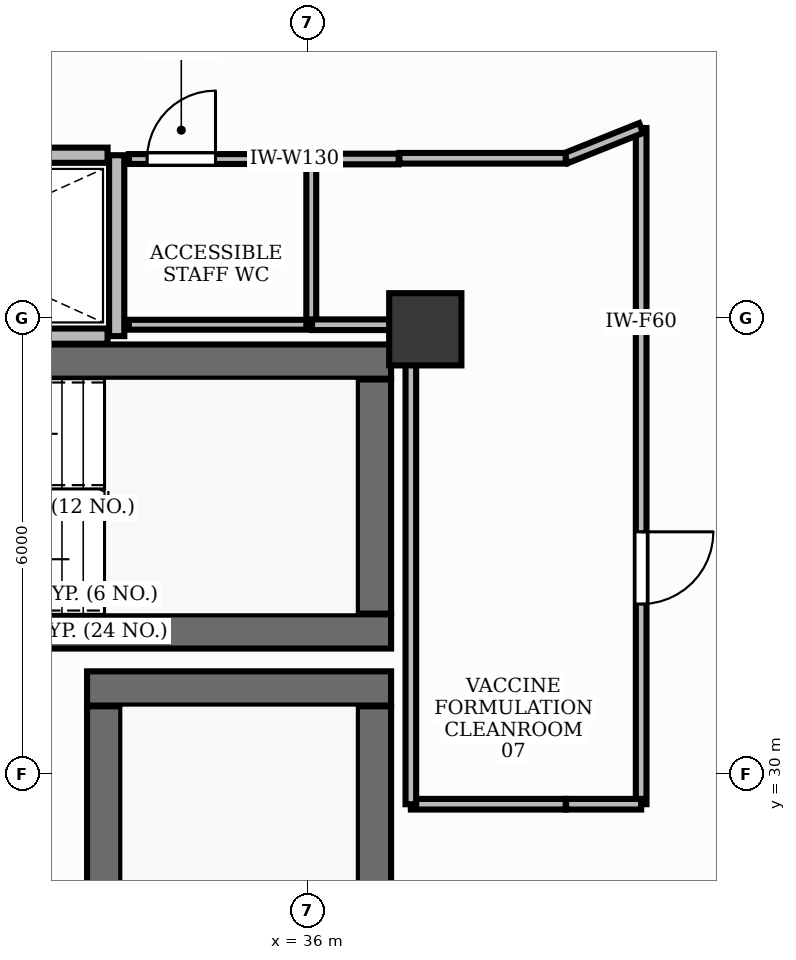
"""IFC4 building model, lengths in metres.
Left out: names, types, materials, properties, quantities, classifications, styles, units other than length and angle.
Written with IfcOpenShell. Run it as: python <this file> out.ifc"""

import sys

from ifc_helpers import new_model, si_unit, direction, frame, frame_2d, origin, origin_2d, place, context, subcontext, project, spatial, rectangle, extrude, element, fill, save


model = new_model("IFC4")
c1 = context("Model", 3, precision=1e-05, world=origin(), true_north=direction((0.0, 1.0)))
c2 = subcontext(c1, "Body", "Model", "MODEL_VIEW")
j1 = project(units=[si_unit("LENGTHUNIT", "METRE"), si_unit("PLANEANGLEUNIT", "RADIAN")], contexts=[c1])
p1 = place(None, origin())
s1 = spatial("IfcSite", under=j1, at=p1, CompositionType="ELEMENT")
p2 = place(p1, origin())
s2 = spatial("IfcBuilding", under=s1, at=p2, CompositionType="ELEMENT")
p3 = place(p2, frame((0.0, 0.0, 94.2)))
s3 = spatial("IfcBuildingStorey", under=s2, at=p3, CompositionType="ELEMENT", Elevation=94.2)
p4 = place(p3, frame((28.852, 35.425, 0.0), z_axis=(0.0, 0.0, 1.0), x_axis=(1.0, 0.0, 0.0)))
e1 = element("IfcWall", 1, at=p4, inside=s3, PredefinedType="SHEAR", context=c2, shape_type="SweptSolid", body=[
    extrude(rectangle(XDim=8.248, YDim=0.45, at=frame_2d((4.124, 0.0))), origin(), (0.0, 0.0, 1.0), 3.9),
])
p5 = place(p3, frame((28.35, 31.875, 0.0), z_axis=(0.0, 0.0, 1.0), x_axis=(1.0, 0.0, 0.0)))
e2 = element("IfcWall", 2, at=p5, inside=s3, PredefinedType="SHEAR", context=c2, shape_type="SweptSolid", body=[
    extrude(rectangle(XDim=8.75, YDim=0.45, at=frame_2d((4.375, 0.0))), origin(), (0.0, 0.0, 1.0), 3.9),
])
p6 = place(p3, frame((36.875, 32.11, 0.0), z_axis=(0.0, 0.0, 1.0), x_axis=(0.0, 1.0, 0.0)))
e3 = element("IfcWall", 3, at=p6, inside=s3, PredefinedType="SHEAR", context=c2, shape_type="SweptSolid", body=[
    extrude(rectangle(XDim=3.08, YDim=0.45, at=frame_2d((1.54, 0.0))), origin(), (0.0, 0.0, 1.0), 3.9),
])
p7 = place(p3, frame((33.1, 31.125, 0.0), z_axis=(0.0, 0.0, 1.0), x_axis=(1.0, 0.0, 0.0)))
e4 = element("IfcWall", 4, at=p7, inside=s3, PredefinedType="SHEAR", context=c2, shape_type="SweptSolid", body=[
    extrude(rectangle(XDim=4.0, YDim=0.45, at=frame_2d((2.0, 0.0))), origin(), (0.0, 0.0, 1.0), 3.9),
])
p8 = place(p3, frame((36.875, 23.11, 0.0), z_axis=(0.0, 0.0, 1.0), x_axis=(0.0, 1.0, 0.0)))
e5 = element("IfcWall", 5, at=p8, inside=s3, PredefinedType="SHEAR", context=c2, shape_type="SweptSolid", body=[
    extrude(rectangle(XDim=7.78, YDim=0.45, at=frame_2d((3.89, 0.0))), origin(), (0.0, 0.0, 1.0), 3.9),
])
p9 = place(p3, frame((33.325, 23.11, 0.0), z_axis=(0.0, 0.0, 1.0), x_axis=(0.0, 1.0, 0.0)))
e6 = element("IfcWall", 6, at=p9, inside=s3, PredefinedType="SHEAR", context=c2, shape_type="SweptSolid", body=[
    extrude(rectangle(XDim=7.78, YDim=0.45, at=frame_2d((3.89, 0.0))), origin(), (0.0, 0.0, 1.0), 3.9),
])
p10 = place(p9, frame((0.2, 0.0, 0.0)))
e7 = element("IfcOpeningElement", 7, at=p10, cuts=e6, PredefinedType="OPENING", context=c2, shape_type="SweptSolid", body=[
    extrude(rectangle(XDim=1.05, YDim=2.15, at=frame_2d((0.525, 1.075))), frame((0.0, 0.24, 0.0), z_axis=(0.0, -1.0, 0.0), x_axis=(1.0, 0.0, 0.0)), (0.0, 0.0, 1.0), 0.48),
])
p11 = place(p3, frame((37.55, 35.85, -0.0), z_axis=(0.0, 0.0, 1.0), x_axis=(1.0, 0.0, 0.0)))
e8 = element("IfcColumn", 8, at=p11, inside=s3, PredefinedType="PILASTER", context=c2, shape_type="SweptSolid", body=[
    extrude(rectangle(XDim=0.95, YDim=0.95, at=origin_2d()), origin(), (0.0, 0.0, 1.0), 3.901),
])
p12 = place(p3, frame((33.49, 35.76, 0.0), z_axis=(0.0, 0.0, 1.0), x_axis=(0.0, 1.0, 0.0)))
e9 = element("IfcWall", 9, at=p12, inside=s3, PredefinedType="PARTITIONING", context=c2, shape_type="SweptSolid", body=[
    extrude(rectangle(XDim=2.38, YDim=0.2, at=frame_2d((1.19, 0.0))), origin(), (0.0, 0.0, 1.0), 2.91),
])
for number, where, z_axis, x_axis in (
    (10, (28.8, 35.76, 0.0), (0.0, 0.0, 1.0), (1.0, 0.0, 0.0)),
    (11, (28.8, 38.14, 0.0), (0.0, 0.0, 1.0), (1.0, 0.0, 0.0)),
):
    element("IfcWall", number, at=place(p3, frame(where, z_axis=z_axis, x_axis=x_axis)), inside=s3, PredefinedType="PARTITIONING", context=c2, shape_type="SweptSolid", body=[
        extrude(rectangle(XDim=4.57, YDim=0.2, at=frame_2d((2.285, 0.0))), origin(), (0.0, 0.0, 1.0), 2.91),
    ])
p13 = place(p3, frame((33.65, 38.09, 0.0), z_axis=(0.0, 0.0, 1.0), x_axis=(1.0, 0.0, 0.0)))
e12 = element("IfcWall", 12, at=p13, inside=s3, PredefinedType="PARTITIONING", context=c2, shape_type="SweptSolid", body=[
    extrude(rectangle(XDim=2.4, YDim=0.13, at=frame_2d((1.2, 0.0))), origin(), (0.0, 0.0, 1.0), 2.91),
])
p14 = place(p13, frame((0.24, 0.0, 0.0)))
e13 = element("IfcOpeningElement", 13, at=p14, cuts=e12, PredefinedType="OPENING", context=c2, shape_type="SweptSolid", body=[
    extrude(rectangle(XDim=0.9, YDim=2.15, at=frame_2d((0.45, 1.075))), frame((0.0, 0.08, 0.0), z_axis=(0.0, -1.0, 0.0), x_axis=(1.0, 0.0, 0.0)), (0.0, 0.0, 1.0), 0.16),
])
p15 = place(p3, frame((40.39, 38.498, 0.0), z_axis=(0.0, 0.0, 1.0), x_axis=(0.0, -1.0, 0.0)))
e14 = element("IfcWall", 14, at=p15, inside=s3, PredefinedType="PARTITIONING", context=c2, shape_type="SweptSolid", body=[
    extrude(rectangle(XDim=8.896, YDim=0.14, at=frame_2d((4.448, 0.0))), origin(), (0.0, 0.0, 1.0), 2.91),
])
p16 = place(p15, frame((5.312, 0.0, 0.0)))
e15 = element("IfcOpeningElement", 15, at=p16, cuts=e14, PredefinedType="OPENING", context=c2, shape_type="SweptSolid", body=[
    extrude(rectangle(XDim=0.95, YDim=2.15, at=frame_2d((0.475, 1.075))), frame((0.0, 0.085, 0.0), z_axis=(0.0, -1.0, 0.0), x_axis=(1.0, 0.0, 0.0)), (0.0, 0.0, 1.0), 0.17),
])
p17 = place(p3, frame((36.05, 35.91, 0.0), z_axis=(0.0, 0.0, 1.0), x_axis=(-1.0, 0.0, 0.0)))
e16 = element("IfcWall", 16, at=p17, inside=s3, PredefinedType="PARTITIONING", context=c2, shape_type="SweptSolid", body=[
    extrude(rectangle(XDim=2.4, YDim=0.13, at=frame_2d((1.2, 0.0))), origin(), (0.0, 0.0, 1.0), 2.91),
])
p18 = place(p3, frame((36.05, 38.09, 0.0), z_axis=(0.0, 0.0, 1.0), x_axis=(0.0, -1.0, 0.0)))
e17 = element("IfcWall", 17, at=p18, inside=s3, PredefinedType="PARTITIONING", context=c2, shape_type="SweptSolid", body=[
    extrude(rectangle(XDim=2.18, YDim=0.13, at=frame_2d((1.09, 0.0))), origin(), (0.0, 0.0, 1.0), 2.91),
])
p19 = place(p3, frame((39.398, 38.1, 0.0), z_axis=(0.0, 0.0, 1.0), x_axis=(0.928098124006, 0.372335698284, 0.0)))
e18 = element("IfcWall", 18, at=p19, inside=s3, PredefinedType="PARTITIONING", context=c2, shape_type="SweptSolid", body=[
    extrude(rectangle(XDim=1.069, YDim=0.14, at=frame_2d((0.534, 0.0))), origin(), (0.0, 0.0, 1.0), 2.91),
])
p20 = place(p3, frame((40.39, 29.602, 0.0), z_axis=(0.0, 0.0, 1.0), x_axis=(-1.0, 0.0, 0.0)))
e19 = element("IfcWall", 19, at=p20, inside=s3, PredefinedType="PARTITIONING", context=c2, shape_type="SweptSolid", body=[
    extrude(rectangle(XDim=0.988, YDim=0.14, at=frame_2d((0.494, 0.0))), origin(), (0.0, 0.0, 1.0), 2.91),
])
p21 = place(p3, frame((39.398, 29.602, 0.0), z_axis=(0.0, 0.0, 1.0), x_axis=(-1.0, 0.0, 0.0)))
e20 = element("IfcWall", 20, at=p21, inside=s3, PredefinedType="PARTITIONING", context=c2, shape_type="SweptSolid", body=[
    extrude(rectangle(XDim=2.038, YDim=0.14, at=frame_2d((1.019, 0.0))), origin(), (0.0, 0.0, 1.0), 2.91),
])
p22 = place(p3, frame((37.36, 29.602, 0.0), z_axis=(0.0, 0.0, 1.0), x_axis=(0.0, 1.0, 0.0)))
e21 = element("IfcWall", 21, at=p22, inside=s3, PredefinedType="PARTITIONING", context=c2, shape_type="SweptSolid", body=[
    extrude(rectangle(XDim=6.298, YDim=0.14, at=frame_2d((3.149, 0.0))), origin(), (0.0, 0.0, 1.0), 2.91),
])
p23 = place(p3, frame((37.35, 35.91, 0.0), z_axis=(0.0, 0.0, 1.0), x_axis=(-1.0, 0.0, 0.0)))
e22 = element("IfcWall", 22, at=p23, inside=s3, PredefinedType="PARTITIONING", context=c2, shape_type="SweptSolid", body=[
    extrude(rectangle(XDim=1.29, YDim=0.14, at=frame_2d((0.645, 0.0))), origin(), (0.0, 0.0, 1.0), 2.91),
])
p24 = place(p3, frame((36.06, 38.09, 0.0), z_axis=(0.0, 0.0, 1.0), x_axis=(1.0, 0.0, 0.0)))
e23 = element("IfcWall", 23, at=p24, inside=s3, PredefinedType="PARTITIONING", context=c2, shape_type="SweptSolid", body=[
    extrude(rectangle(XDim=1.14, YDim=0.14, at=frame_2d((0.57, 0.0))), origin(), (0.0, 0.0, 1.0), 2.91),
])
p25 = place(p3, frame((37.21, 38.1, 0.0), z_axis=(0.0, 0.0, 1.0), x_axis=(1.0, 0.0, 0.0)))
e24 = element("IfcWall", 24, at=p25, inside=s3, PredefinedType="PARTITIONING", context=c2, shape_type="SweptSolid", body=[
    extrude(rectangle(XDim=2.188, YDim=0.14, at=frame_2d((1.094, 0.0))), origin(), (0.0, 0.0, 1.0), 2.91),
])
p26 = place(p14, origin())
e25 = element("IfcDoor", 25, at=p26, inside=s3, OperationType="SINGLE_SWING_RIGHT", PredefinedType="DOOR", context=c2, shape_type="SweptSolid", body=[
    extrude(rectangle(XDim=0.9, YDim=2.15, at=frame_2d((0.45, 1.075))), frame((0.0, 0.025, 0.0), z_axis=(0.0, -1.0, 0.0), x_axis=(1.0, 0.0, 0.0)), (0.0, 0.0, 1.0), 0.05),
])
fill(e13, e25)
p27 = place(p16, origin())
e26 = element("IfcDoor", 26, at=p27, inside=s3, OperationType="SINGLE_SWING_LEFT", PredefinedType="DOOR", context=c2, shape_type="SweptSolid", body=[
    extrude(rectangle(XDim=0.95, YDim=2.15, at=frame_2d((0.475, 1.075))), frame((0.0, 0.025, 0.0), z_axis=(0.0, -1.0, 0.0), x_axis=(1.0, 0.0, 0.0)), (0.0, 0.0, 1.0), 0.05),
])
fill(e15, e26)
save(model, sys.argv[1])
